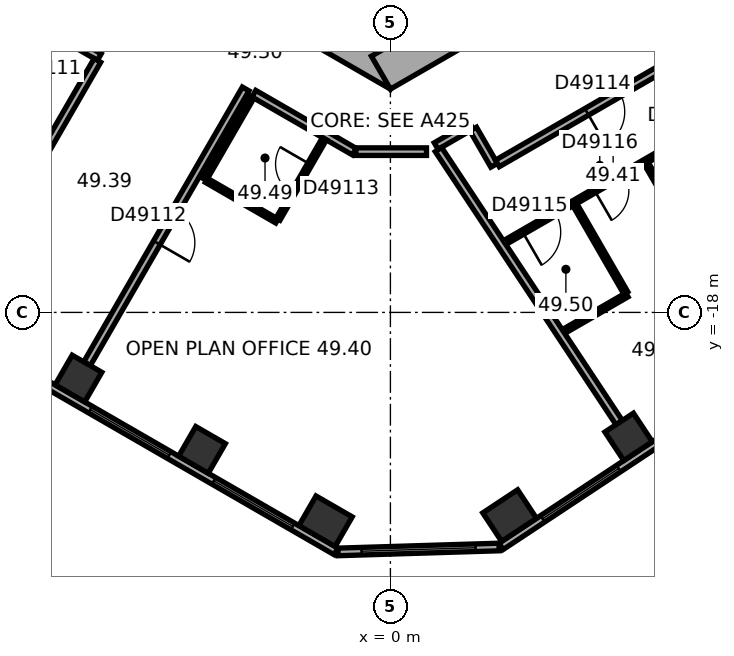
"""IFC4 building model, lengths in metres.
Left out: names, types, materials, properties, quantities, classifications, styles, units other than length and angle.
Written with IfcOpenShell. Run it as: python <this file> out.ifc"""

import sys

from ifc_helpers import new_model, si_unit, direction, frame, frame_2d, origin, origin_2d, place, context, subcontext, project, spatial, rectangle, extrude, element, fill, save


model = new_model("IFC4")
c1 = context("Model", 3, precision=1e-05, world=origin(), true_north=direction((0.0, 1.0)))
c2 = subcontext(c1, "Body", "Model", "MODEL_VIEW")
j1 = project(units=[si_unit("LENGTHUNIT", "METRE"), si_unit("PLANEANGLEUNIT", "RADIAN")], contexts=[c1])
p1 = place(None, origin())
s1 = spatial("IfcSite", under=j1, at=p1, CompositionType="ELEMENT")
p2 = place(p1, origin())
s2 = spatial("IfcBuilding", under=s1, at=p2, CompositionType="ELEMENT")
p3 = place(p2, frame((0.0, 0.0, 198.4)))
s3 = spatial("IfcBuildingStorey", under=s2, at=p3, CompositionType="ELEMENT", Elevation=198.4)
for number, where, z_axis, x_axis in (
    (1, (-8.208, -19.74, 0.0), (0.0, 0.0, 1.0), (0.866, -0.5, 0.0)),
    (2, (-4.958, -21.617, 0.0), (0.0, 0.0, 1.0), (0.866, -0.5, 0.0)),
):
    element("IfcColumn", number, at=place(p3, frame(where, z_axis=z_axis, x_axis=x_axis)), inside=s3, PredefinedType="COLUMN", context=c2, shape_type="SweptSolid", body=[
        extrude(rectangle(XDim=0.9, YDim=0.9, at=origin_2d()), origin(), (0.0, 0.0, 1.0), 3.7),
    ])
for number, where, z_axis, x_axis in (
    (3, (-1.706, -23.494, 0.0), (0.0, 0.0, 1.0), (0.866, -0.5, 0.0)),
    (4, (3.137, -23.346, 0.0), (0.0, 0.0, 1.0), (0.834, 0.552, 0.0)),
):
    element("IfcColumn", number, at=place(p3, frame(where, z_axis=z_axis, x_axis=x_axis)), inside=s3, PredefinedType="COLUMN", context=c2, shape_type="SweptSolid", body=[
        extrude(rectangle(XDim=1.1, YDim=0.9, at=origin_2d()), origin(), (0.0, 0.0, 1.0), 3.7),
    ])
p4 = place(p3, frame((6.268, -21.274, 0.0), z_axis=(0.0, 0.0, 1.0), x_axis=(0.833885822067, 0.551936985312, 0.0)))
e5 = element("IfcColumn", 5, at=p4, inside=s3, PredefinedType="COLUMN", context=c2, shape_type="SweptSolid", body=[
    extrude(rectangle(XDim=0.9, YDim=0.9, at=origin_2d()), origin(), (0.0, 0.0, 1.0), 3.7),
])
p5 = place(p3, frame((-10.25, -5.629, 0.0), z_axis=(0.0, 0.0, 1.0), x_axis=(0.866022616891, -0.50000482701, 0.0)))
e6 = element("IfcWall", 6, at=p5, inside=s3, PredefinedType="SHEAR", context=c2, shape_type="SweptSolid", body=[
    extrude(rectangle(XDim=12.125, YDim=1.0, at=frame_2d((6.062, 0.0))), origin(), (0.0, 0.0, 1.0), 3.7),
])
p6 = place(p5, frame((6.262, 0.0, 0.0)))
e7 = element("IfcOpeningElement", 7, at=p6, cuts=e6, PredefinedType="OPENING", context=c2, shape_type="SweptSolid", body=[
    extrude(rectangle(XDim=1.5, YDim=2.1, at=frame_2d((0.75, 1.05))), frame((0.0, 0.51, 0.0), z_axis=(0.0, -1.0, 0.0), x_axis=(1.0, 0.0, 0.0)), (0.0, 0.0, 1.0), 1.02),
])
p7 = place(p5, frame((1.712, 0.0, 0.0)))
e8 = element("IfcOpeningElement", 8, at=p7, cuts=e6, PredefinedType="OPENING", context=c2, shape_type="SweptSolid", body=[
    extrude(rectangle(XDim=1.1, YDim=2.1, at=frame_2d((0.55, 1.05))), frame((0.0, 0.51, 0.0), z_axis=(0.0, -1.0, 0.0), x_axis=(1.0, 0.0, 0.0)), (0.0, 0.0, 1.0), 1.02),
])
p8 = place(p5, frame((4.312, 0.0, 0.0)))
e9 = element("IfcOpeningElement", 9, at=p8, cuts=e6, PredefinedType="OPENING", context=c2, shape_type="SweptSolid", body=[
    extrude(rectangle(XDim=1.1, YDim=2.1, at=frame_2d((0.55, 1.05))), frame((0.0, 0.51, 0.0), z_axis=(0.0, -1.0, 0.0), x_axis=(1.0, 0.0, 0.0)), (0.0, 0.0, 1.0), 1.02),
])
p9 = place(p3, frame((-0.25, -11.691, 0.0), z_axis=(0.0, 0.0, 1.0), x_axis=(0.866022616891, 0.50000482701, 0.0)))
e10 = element("IfcWall", 10, at=p9, inside=s3, PredefinedType="SHEAR", context=c2, shape_type="SweptSolid", body=[
    extrude(rectangle(XDim=12.125, YDim=1.0, at=frame_2d((6.062, 0.0))), origin(), (0.0, 0.0, 1.0), 3.7),
])
p10 = place(p9, frame((2.612, 0.0, 0.0)))
e11 = element("IfcOpeningElement", 11, at=p10, cuts=e10, PredefinedType="OPENING", context=c2, shape_type="SweptSolid", body=[
    extrude(rectangle(XDim=1.1, YDim=2.1, at=frame_2d((0.55, 1.05))), frame((0.0, 0.51, 0.0), z_axis=(0.0, -1.0, 0.0), x_axis=(1.0, 0.0, 0.0)), (0.0, 0.0, 1.0), 1.02),
])
p11 = place(p9, frame((5.212, 0.0, 0.0)))
e12 = element("IfcOpeningElement", 12, at=p11, cuts=e10, PredefinedType="OPENING", context=c2, shape_type="SweptSolid", body=[
    extrude(rectangle(XDim=1.1, YDim=2.1, at=frame_2d((0.55, 1.05))), frame((0.0, 0.51, 0.0), z_axis=(0.0, -1.0, 0.0), x_axis=(1.0, 0.0, 0.0)), (0.0, 0.0, 1.0), 1.02),
])
p12 = place(p9, frame((7.812, 0.0, 0.0)))
e13 = element("IfcOpeningElement", 13, at=p12, cuts=e10, PredefinedType="OPENING", context=c2, shape_type="SweptSolid", body=[
    extrude(rectangle(XDim=1.1, YDim=2.1, at=frame_2d((0.55, 1.05))), frame((0.0, 0.51, 0.0), z_axis=(0.0, -1.0, 0.0), x_axis=(1.0, 0.0, 0.0)), (0.0, 0.0, 1.0), 1.02),
])
p13 = place(p3, frame((-18.789, -14.267, 0.0), z_axis=(0.0, 0.0, 1.0), x_axis=(0.866023315909, -0.500003616288, 0.0)))
e14 = element("IfcWall", 14, at=p13, inside=s3, PredefinedType="STANDARD", context=c2, shape_type="SweptSolid", body=[
    extrude(rectangle(XDim=20.044, YDim=0.2, at=frame_2d((10.022, 0.0))), origin(), (0.0, 0.0, 1.0), 3.7),
])
p14 = place(p13, frame((1.314, 0.0, 0.9)))
e15 = element("IfcOpeningElement", 15, at=p14, cuts=e14, PredefinedType="OPENING", context=c2, shape_type="SweptSolid", body=[
    extrude(rectangle(XDim=2.4, YDim=2.0, at=frame_2d((1.2, 1.0))), frame((0.0, 0.11, 0.0), z_axis=(0.0, -1.0, 0.0), x_axis=(1.0, 0.0, 0.0)), (0.0, 0.0, 1.0), 0.22),
])
p15 = place(p13, frame((5.069, 0.0, 0.9)))
e16 = element("IfcOpeningElement", 16, at=p15, cuts=e14, PredefinedType="OPENING", context=c2, shape_type="SweptSolid", body=[
    extrude(rectangle(XDim=2.4, YDim=2.0, at=frame_2d((1.2, 1.0))), frame((0.0, 0.11, 0.0), z_axis=(0.0, -1.0, 0.0), x_axis=(1.0, 0.0, 0.0)), (0.0, 0.0, 1.0), 0.22),
])
p16 = place(p13, frame((8.823, 0.0, 0.9)))
e17 = element("IfcOpeningElement", 17, at=p16, cuts=e14, PredefinedType="OPENING", context=c2, shape_type="SweptSolid", body=[
    extrude(rectangle(XDim=2.4, YDim=2.0, at=frame_2d((1.2, 1.0))), frame((0.0, 0.11, 0.0), z_axis=(0.0, -1.0, 0.0), x_axis=(1.0, 0.0, 0.0)), (0.0, 0.0, 1.0), 0.22),
])
p17 = place(p13, frame((12.577, 0.0, 0.9)))
e18 = element("IfcOpeningElement", 18, at=p17, cuts=e14, PredefinedType="OPENING", context=c2, shape_type="SweptSolid", body=[
    extrude(rectangle(XDim=2.4, YDim=2.0, at=frame_2d((1.2, 1.0))), frame((0.0, 0.11, 0.0), z_axis=(0.0, -1.0, 0.0), x_axis=(1.0, 0.0, 0.0)), (0.0, 0.0, 1.0), 0.22),
])
p18 = place(p13, frame((16.331, 0.0, 0.9)))
e19 = element("IfcOpeningElement", 19, at=p18, cuts=e14, PredefinedType="OPENING", context=c2, shape_type="SweptSolid", body=[
    extrude(rectangle(XDim=2.4, YDim=2.0, at=frame_2d((1.2, 1.0))), frame((0.0, 0.11, 0.0), z_axis=(0.0, -1.0, 0.0), x_axis=(1.0, 0.0, 0.0)), (0.0, 0.0, 1.0), 0.22),
])
p19 = place(p3, frame((-1.378, -24.302, 0.0), z_axis=(0.0, 0.0, 1.0), x_axis=(0.999533857267, 0.030529791629, 0.0)))
e20 = element("IfcWall", 20, at=p19, inside=s3, PredefinedType="STANDARD", context=c2, shape_type="SweptSolid", body=[
    extrude(rectangle(XDim=4.238, YDim=0.2, at=frame_2d((2.119, 0.0))), origin(), (0.0, 0.0, 1.0), 3.7),
])
p20 = place(p19, frame((0.619, 0.0, 0.9)))
e21 = element("IfcOpeningElement", 21, at=p20, cuts=e20, PredefinedType="OPENING", context=c2, shape_type="SweptSolid", body=[
    extrude(rectangle(XDim=3.0, YDim=2.0, at=frame_2d((1.5, 1.0))), frame((0.0, 0.11, 0.0), z_axis=(0.0, -1.0, 0.0), x_axis=(1.0, 0.0, 0.0)), (0.0, 0.0, 1.0), 0.22),
])
p21 = place(p3, frame((2.911, -24.156, 0.0), z_axis=(0.0, 0.0, 1.0), x_axis=(0.833882163564, 0.551942512668, 0.0)))
e22 = element("IfcWall", 22, at=p21, inside=s3, PredefinedType="STANDARD", context=c2, shape_type="SweptSolid", body=[
    extrude(rectangle(XDim=20.044, YDim=0.2, at=frame_2d((10.022, 0.0))), origin(), (0.0, 0.0, 1.0), 3.7),
])
p22 = place(p21, frame((1.313, 0.0, 0.9)))
e23 = element("IfcOpeningElement", 23, at=p22, cuts=e22, PredefinedType="OPENING", context=c2, shape_type="SweptSolid", body=[
    extrude(rectangle(XDim=2.4, YDim=2.0, at=frame_2d((1.2, 1.0))), frame((0.0, 0.11, 0.0), z_axis=(0.0, -1.0, 0.0), x_axis=(1.0, 0.0, 0.0)), (0.0, 0.0, 1.0), 0.22),
])
p23 = place(p21, frame((5.067, 0.0, 0.9)))
e24 = element("IfcOpeningElement", 24, at=p23, cuts=e22, PredefinedType="OPENING", context=c2, shape_type="SweptSolid", body=[
    extrude(rectangle(XDim=2.4, YDim=2.0, at=frame_2d((1.2, 1.0))), frame((0.0, 0.11, 0.0), z_axis=(0.0, -1.0, 0.0), x_axis=(1.0, 0.0, 0.0)), (0.0, 0.0, 1.0), 0.22),
])
p24 = place(p21, frame((8.821, 0.0, 0.9)))
e25 = element("IfcOpeningElement", 25, at=p24, cuts=e22, PredefinedType="OPENING", context=c2, shape_type="SweptSolid", body=[
    extrude(rectangle(XDim=2.4, YDim=2.0, at=frame_2d((1.2, 1.0))), frame((0.0, 0.11, 0.0), z_axis=(0.0, -1.0, 0.0), x_axis=(1.0, 0.0, 0.0)), (0.0, 0.0, 1.0), 0.22),
])
p25 = place(p21, frame((12.575, 0.0, 0.9)))
e26 = element("IfcOpeningElement", 26, at=p25, cuts=e22, PredefinedType="OPENING", context=c2, shape_type="SweptSolid", body=[
    extrude(rectangle(XDim=2.4, YDim=2.0, at=frame_2d((1.2, 1.0))), frame((0.0, 0.11, 0.0), z_axis=(0.0, -1.0, 0.0), x_axis=(1.0, 0.0, 0.0)), (0.0, 0.0, 1.0), 0.22),
])
p26 = place(p21, frame((16.329, 0.0, 0.9)))
e27 = element("IfcOpeningElement", 27, at=p26, cuts=e22, PredefinedType="OPENING", context=c2, shape_type="SweptSolid", body=[
    extrude(rectangle(XDim=2.4, YDim=2.0, at=frame_2d((1.2, 1.0))), frame((0.0, 0.11, 0.0), z_axis=(0.0, -1.0, 0.0), x_axis=(1.0, 0.0, 0.0)), (0.0, 0.0, 1.0), 0.22),
])
p27 = place(p3, frame((-11.435, -9.103, 0.0), z_axis=(0.0, 0.0, 1.0), x_axis=(0.866007399799, -0.500031182522, 0.0)))
e28 = element("IfcWall", 28, at=p27, inside=s3, PredefinedType="PARTITIONING", context=c2, shape_type="SweptSolid", body=[
    extrude(rectangle(XDim=4.358, YDim=0.2, at=frame_2d((2.179, 0.0))), origin(), (0.0, 0.0, 1.0), 3.42),
])
p28 = place(p3, frame((-11.235, -17.474, 0.0), z_axis=(0.0, 0.0, 1.0), x_axis=(0.500009260695, 0.866020057054, 0.0)))
e29 = element("IfcWall", 29, at=p28, inside=s3, PredefinedType="PARTITIONING", context=c2, shape_type="SweptSolid", body=[
    extrude(rectangle(XDim=7.049, YDim=0.2, at=frame_2d((3.524, 0.0))), origin(), (0.0, 0.0, 1.0), 2.87),
])
p29 = place(p28, frame((3.024, 0.0, 0.0)))
e30 = element("IfcOpeningElement", 30, at=p29, cuts=e29, PredefinedType="OPENING", context=c2, shape_type="SweptSolid", body=[
    extrude(rectangle(XDim=1.0, YDim=2.1, at=frame_2d((0.5, 1.05))), frame((0.0, 0.11, 0.0), z_axis=(0.0, -1.0, 0.0), x_axis=(1.0, 0.0, 0.0)), (0.0, 0.0, 1.0), 0.22),
])
p30 = place(p3, frame((-7.984, -19.351, 0.0), z_axis=(0.0, 0.0, 1.0), x_axis=(0.500010139422, 0.866019549707, 0.0)))
e31 = element("IfcWall", 31, at=p30, inside=s3, PredefinedType="PARTITIONING", context=c2, shape_type="SweptSolid", body=[
    extrude(rectangle(XDim=8.35, YDim=0.2, at=frame_2d((4.175, 0.0))), origin(), (0.0, 0.0, 1.0), 3.42),
])
p31 = place(p30, frame((3.675, 0.0, 0.0)))
e32 = element("IfcOpeningElement", 32, at=p31, cuts=e31, PredefinedType="OPENING", context=c2, shape_type="SweptSolid", body=[
    extrude(rectangle(XDim=1.0, YDim=2.1, at=frame_2d((0.5, 1.05))), frame((0.0, 0.11, 0.0), z_axis=(0.0, -1.0, 0.0), x_axis=(1.0, 0.0, 0.0)), (0.0, 0.0, 1.0), 0.22),
])
p32 = place(p3, frame((-4.892, -14.496, 0.0), z_axis=(0.0, 0.0, 1.0), x_axis=(0.500004234368, 0.866022959057, 0.0)))
e33 = element("IfcWall", 33, at=p32, inside=s3, PredefinedType="PARTITIONING", context=c2, shape_type="SweptSolid", body=[
    extrude(rectangle(XDim=2.5, YDim=0.12, at=frame_2d((1.25, 0.0))), origin(), (0.0, 0.0, 1.0), 3.42),
])
p33 = place(p3, frame((-3.592, -12.244, 0.0), z_axis=(0.0, 0.0, 1.0), x_axis=(0.866028335764, -0.499994921628, 0.0)))
e34 = element("IfcWall", 34, at=p33, inside=s3, PredefinedType="PARTITIONING", context=c2, shape_type="SweptSolid", body=[
    extrude(rectangle(XDim=3.051, YDim=0.2, at=frame_2d((1.525, 0.0))), origin(), (0.0, 0.0, 1.0), 3.42),
])
p34 = place(p3, frame((-2.987, -15.596, 0.0), z_axis=(0.0, 0.0, 1.0), x_axis=(-0.86600889856, 0.500028586798, 0.0)))
e35 = element("IfcWall", 35, at=p34, inside=s3, PredefinedType="PARTITIONING", context=c2, shape_type="SweptSolid", body=[
    extrude(rectangle(XDim=2.14, YDim=0.12, at=frame_2d((1.07, 0.0))), origin(), (0.0, 0.0, 1.0), 3.42),
])
p35 = place(p3, frame((-1.737, -13.431, 0.0), z_axis=(0.0, 0.0, 1.0), x_axis=(-0.499959183527, -0.866048967903, 0.0)))
e36 = element("IfcWall", 36, at=p35, inside=s3, PredefinedType="PARTITIONING", context=c2, shape_type="SweptSolid", body=[
    extrude(rectangle(XDim=2.44, YDim=0.12, at=frame_2d((1.22, 0.0))), origin(), (0.0, 0.0, 1.0), 3.42),
])
p36 = place(p35, frame((0.77, 0.0, 0.0)))
e37 = element("IfcOpeningElement", 37, at=p36, cuts=e36, PredefinedType="OPENING", context=c2, shape_type="SweptSolid", body=[
    extrude(rectangle(XDim=0.9, YDim=2.1, at=frame_2d((0.45, 1.05))), frame((0.0, 0.07, 0.0), z_axis=(0.0, -1.0, 0.0), x_axis=(1.0, 0.0, 0.0)), (0.0, 0.0, 1.0), 0.14),
])
p37 = place(p3, frame((-0.91, -13.77, 0.0), z_axis=(0.0, 0.0, 1.0), x_axis=(1.0, 0.0, 0.0)))
e38 = element("IfcWall", 38, at=p37, inside=s3, PredefinedType="PARTITIONING", context=c2, shape_type="SweptSolid", body=[
    extrude(rectangle(XDim=1.86, YDim=0.2, at=frame_2d((0.93, 0.0))), origin(), (0.0, 0.0, 1.0), 3.42),
])
p38 = place(p3, frame((1.204, -13.623, 0.0), z_axis=(0.0, 0.0, 1.0), x_axis=(0.866040989419, 0.499973003918, 0.0)))
e39 = element("IfcWall", 39, at=p38, inside=s3, PredefinedType="PARTITIONING", context=c2, shape_type="SweptSolid", body=[
    extrude(rectangle(XDim=1.068, YDim=0.2, at=frame_2d((0.534, 0.0))), origin(), (0.0, 0.0, 1.0), 3.42),
])
p39 = place(p3, frame((2.179, -13.176, 0.0), z_axis=(0.0, 0.0, 1.0), x_axis=(0.499978356969, -0.866037899034, 0.0)))
e40 = element("IfcWall", 40, at=p39, inside=s3, PredefinedType="PARTITIONING", context=c2, shape_type="SweptSolid", body=[
    extrude(rectangle(XDim=1.101, YDim=0.2, at=frame_2d((0.551, 0.0))), origin(), (0.0, 0.0, 1.0), 3.42),
])
p40 = place(p3, frame((2.816, -14.079, 0.0), z_axis=(0.0, 0.0, 1.0), x_axis=(0.866021128829, 0.500007404367, 0.0)))
e41 = element("IfcWall", 41, at=p40, inside=s3, PredefinedType="PARTITIONING", context=c2, shape_type="SweptSolid", body=[
    extrude(rectangle(XDim=8.702, YDim=0.2, at=frame_2d((4.351, 0.0))), origin(), (0.0, 0.0, 1.0), 3.42),
])
p41 = place(p40, frame((2.714, 0.0, 0.0)))
e42 = element("IfcOpeningElement", 42, at=p41, cuts=e41, PredefinedType="OPENING", context=c2, shape_type="SweptSolid", body=[
    extrude(rectangle(XDim=1.0, YDim=2.1, at=frame_2d((0.5, 1.05))), frame((0.0, 0.11, 0.0), z_axis=(0.0, -1.0, 0.0), x_axis=(1.0, 0.0, 0.0)), (0.0, 0.0, 1.0), 0.22),
])
p42 = place(p3, frame((3.005, -16.164, 0.0), z_axis=(0.0, 0.0, 1.0), x_axis=(0.866018452427, 0.500012039911, 0.0)))
e43 = element("IfcWall", 43, at=p42, inside=s3, PredefinedType="PARTITIONING", context=c2, shape_type="SweptSolid", body=[
    extrude(rectangle(XDim=7.322, YDim=0.12, at=frame_2d((3.661, 0.0))), origin(), (0.0, 0.0, 1.0), 3.42),
])
p43 = place(p42, frame((0.55, 0.0, 0.0)))
e44 = element("IfcOpeningElement", 44, at=p43, cuts=e43, PredefinedType="OPENING", context=c2, shape_type="SweptSolid", body=[
    extrude(rectangle(XDim=1.0, YDim=2.1, at=frame_2d((0.5, 1.05))), frame((0.0, 0.07, 0.0), z_axis=(0.0, -1.0, 0.0), x_axis=(1.0, 0.0, 0.0)), (0.0, 0.0, 1.0), 0.14),
])
p44 = place(p42, frame((2.736, 0.0, 0.0)))
e45 = element("IfcOpeningElement", 45, at=p44, cuts=e43, PredefinedType="OPENING", context=c2, shape_type="SweptSolid", body=[
    extrude(rectangle(XDim=0.9, YDim=2.1, at=frame_2d((0.45, 1.05))), frame((0.0, 0.07, 0.0), z_axis=(0.0, -1.0, 0.0), x_axis=(1.0, 0.0, 0.0)), (0.0, 0.0, 1.0), 0.14),
])
p45 = place(p42, frame((5.347, 0.0, 0.0)))
e46 = element("IfcOpeningElement", 46, at=p45, cuts=e43, PredefinedType="OPENING", context=c2, shape_type="SweptSolid", body=[
    extrude(rectangle(XDim=0.9, YDim=2.1, at=frame_2d((0.45, 1.05))), frame((0.0, 0.07, 0.0), z_axis=(0.0, -1.0, 0.0), x_axis=(1.0, 0.0, 0.0)), (0.0, 0.0, 1.0), 0.14),
])
p46 = place(p3, frame((4.553, -18.503, 0.0), z_axis=(0.0, 0.0, 1.0), x_axis=(0.865951573249, 0.50012785644, 0.0)))
e47 = element("IfcWall", 47, at=p46, inside=s3, PredefinedType="PARTITIONING", context=c2, shape_type="SweptSolid", body=[
    extrude(rectangle(XDim=1.929, YDim=0.12, at=frame_2d((0.964, 0.0))), origin(), (0.0, 0.0, 1.0), 3.42),
])
p47 = place(p3, frame((6.02, -20.899, 0.0), z_axis=(0.0, 0.0, 1.0), x_axis=(-0.551943990108, 0.833881185651, 0.0)))
e48 = element("IfcWall", 48, at=p47, inside=s3, PredefinedType="PARTITIONING", context=c2, shape_type="SweptSolid", body=[
    extrude(rectangle(XDim=8.615, YDim=0.2, at=frame_2d((4.308, 0.0))), origin(), (0.0, 0.0, 1.0), 3.42),
])
p48 = place(p3, frame((6.194, -17.487, 0.0), z_axis=(0.0, 0.0, 1.0), x_axis=(-0.499980071345, 0.866036909293, 0.0)))
e49 = element("IfcWall", 49, at=p48, inside=s3, PredefinedType="PARTITIONING", context=c2, shape_type="SweptSolid", body=[
    extrude(rectangle(XDim=2.68, YDim=0.12, at=frame_2d((1.34, 0.0))), origin(), (0.0, 0.0, 1.0), 3.42),
])
p49 = place(p3, frame((9.385, -18.672, 0.0), z_axis=(0.0, 0.0, 1.0), x_axis=(-0.500012117035, 0.866018407898, 0.0)))
e50 = element("IfcWall", 50, at=p49, inside=s3, PredefinedType="PARTITIONING", context=c2, shape_type="SweptSolid", body=[
    extrude(rectangle(XDim=5.302, YDim=0.12, at=frame_2d((2.651, 0.0))), origin(), (0.0, 0.0, 1.0), 2.87),
])
p50 = place(p17, origin())
e51 = element("IfcWindow", 51, at=p50, inside=s3, PartitioningType="SINGLE_PANEL", PredefinedType="WINDOW", context=c2, shape_type="SweptSolid", body=[
    extrude(rectangle(XDim=2.4, YDim=2.0, at=frame_2d((1.2, 1.0))), frame((0.0, 0.03, 0.0), z_axis=(0.0, -1.0, 0.0), x_axis=(1.0, 0.0, 0.0)), (0.0, 0.0, 1.0), 0.06),
])
fill(e18, e51)
p51 = place(p18, origin())
e52 = element("IfcWindow", 52, at=p51, inside=s3, PartitioningType="SINGLE_PANEL", PredefinedType="WINDOW", context=c2, shape_type="SweptSolid", body=[
    extrude(rectangle(XDim=2.4, YDim=2.0, at=frame_2d((1.2, 1.0))), frame((0.0, 0.03, 0.0), z_axis=(0.0, -1.0, 0.0), x_axis=(1.0, 0.0, 0.0)), (0.0, 0.0, 1.0), 0.06),
])
fill(e19, e52)
p52 = place(p20, origin())
e53 = element("IfcWindow", 53, at=p52, inside=s3, PartitioningType="SINGLE_PANEL", PredefinedType="WINDOW", context=c2, shape_type="SweptSolid", body=[
    extrude(rectangle(XDim=3.0, YDim=2.0, at=frame_2d((1.5, 1.0))), frame((0.0, 0.03, 0.0), z_axis=(0.0, -1.0, 0.0), x_axis=(1.0, 0.0, 0.0)), (0.0, 0.0, 1.0), 0.06),
])
fill(e21, e53)
p53 = place(p22, origin())
e54 = element("IfcWindow", 54, at=p53, inside=s3, PartitioningType="SINGLE_PANEL", PredefinedType="WINDOW", context=c2, shape_type="SweptSolid", body=[
    extrude(rectangle(XDim=2.4, YDim=2.0, at=frame_2d((1.2, 1.0))), frame((0.0, 0.03, 0.0), z_axis=(0.0, -1.0, 0.0), x_axis=(1.0, 0.0, 0.0)), (0.0, 0.0, 1.0), 0.06),
])
fill(e23, e54)
p54 = place(p31, origin())
e55 = element("IfcDoor", 55, at=p54, inside=s3, OperationType="SINGLE_SWING_LEFT", PredefinedType="DOOR", context=c2, shape_type="SweptSolid", body=[
    extrude(rectangle(XDim=1.0, YDim=2.1, at=frame_2d((0.5, 1.05))), frame((0.0, 0.025, 0.0), z_axis=(0.0, -1.0, 0.0), x_axis=(1.0, 0.0, 0.0)), (0.0, 0.0, 1.0), 0.05),
])
fill(e32, e55)
p55 = place(p36, origin())
e56 = element("IfcDoor", 56, at=p55, inside=s3, OperationType="SINGLE_SWING_LEFT", PredefinedType="DOOR", context=c2, shape_type="SweptSolid", body=[
    extrude(rectangle(XDim=0.9, YDim=2.1, at=frame_2d((0.45, 1.05))), frame((0.0, 0.025, 0.0), z_axis=(0.0, -1.0, 0.0), x_axis=(1.0, 0.0, 0.0)), (0.0, 0.0, 1.0), 0.05),
])
fill(e37, e56)
p56 = place(p41, origin())
e57 = element("IfcDoor", 57, at=p56, inside=s3, OperationType="SINGLE_SWING_LEFT", PredefinedType="DOOR", context=c2, shape_type="SweptSolid", body=[
    extrude(rectangle(XDim=1.0, YDim=2.1, at=frame_2d((0.5, 1.05))), frame((0.0, 0.025, 0.0), z_axis=(0.0, -1.0, 0.0), x_axis=(1.0, 0.0, 0.0)), (0.0, 0.0, 1.0), 0.05),
])
fill(e42, e57)
p57 = place(p43, origin())
e58 = element("IfcDoor", 58, at=p57, inside=s3, OperationType="SINGLE_SWING_LEFT", PredefinedType="DOOR", context=c2, shape_type="SweptSolid", body=[
    extrude(rectangle(XDim=1.0, YDim=2.1, at=frame_2d((0.5, 1.05))), frame((0.0, 0.025, 0.0), z_axis=(0.0, -1.0, 0.0), x_axis=(1.0, 0.0, 0.0)), (0.0, 0.0, 1.0), 0.05),
])
fill(e44, e58)
p58 = place(p44, origin())
e59 = element("IfcDoor", 59, at=p58, inside=s3, OperationType="SINGLE_SWING_LEFT", PredefinedType="DOOR", context=c2, shape_type="SweptSolid", body=[
    extrude(rectangle(XDim=0.9, YDim=2.1, at=frame_2d((0.45, 1.05))), frame((0.0, 0.025, 0.0), z_axis=(0.0, -1.0, 0.0), x_axis=(1.0, 0.0, 0.0)), (0.0, 0.0, 1.0), 0.05),
])
fill(e45, e59)
save(model, sys.argv[1])
